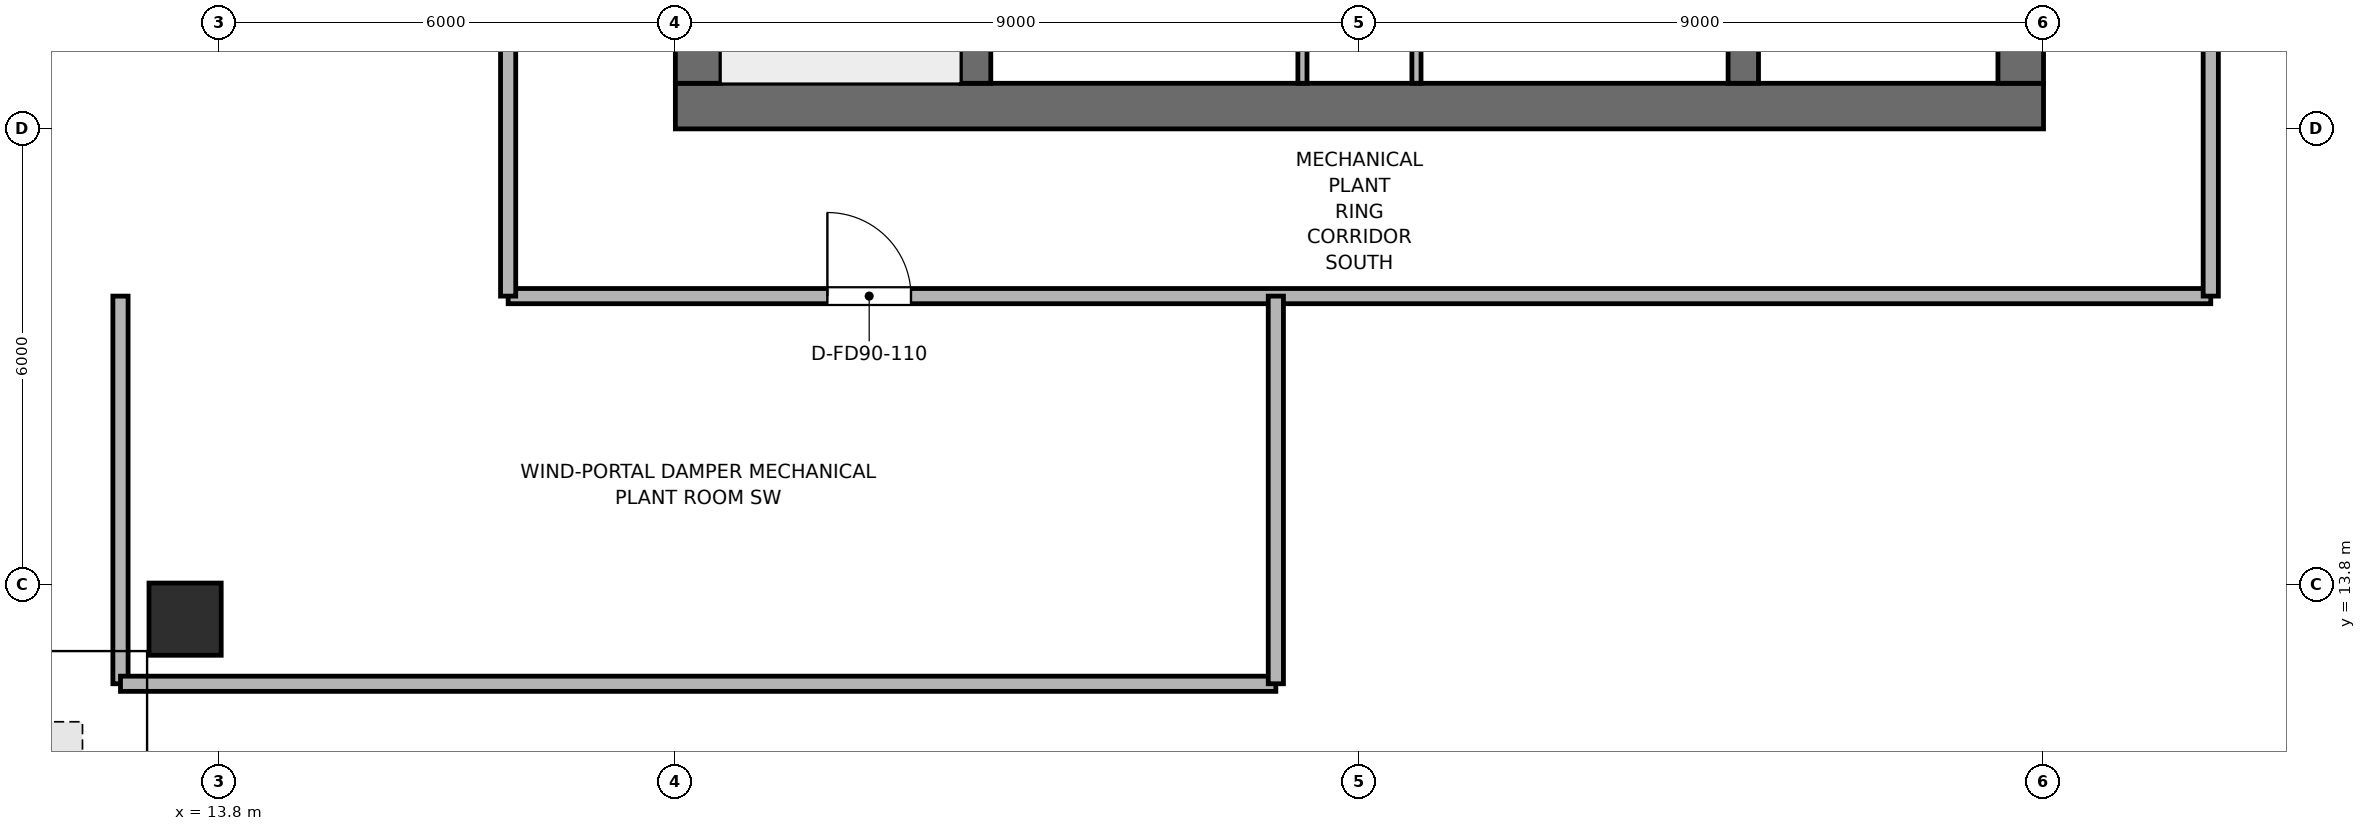
"""IFC4 building model, lengths in metres.
Left out: names, types, materials, properties, quantities, classifications, styles, units other than length and angle.
Written with IfcOpenShell. Run it as: python <this file> out.ifc"""

import sys

from ifc_helpers import new_model, si_unit, direction, frame, frame_2d, origin, origin_2d, place, context, subcontext, project, spatial, rectangle, extrude, element, fill, save


model = new_model("IFC4")
c1 = context("Model", 3, precision=1e-05, world=origin(), true_north=direction((0.0, 1.0)))
c2 = subcontext(c1, "Body", "Model", "MODEL_VIEW")
j1 = project(units=[si_unit("LENGTHUNIT", "METRE"), si_unit("PLANEANGLEUNIT", "RADIAN")], contexts=[c1])
p1 = place(None, origin())
s1 = spatial("IfcSite", under=j1, at=p1, CompositionType="ELEMENT")
p2 = place(p1, origin())
s2 = spatial("IfcBuilding", under=s1, at=p2, CompositionType="ELEMENT")
p3 = place(p2, frame((0.0, 0.0, 289.5)))
s3 = spatial("IfcBuildingStorey", under=s2, at=p3, CompositionType="ELEMENT", Elevation=289.5)
p4 = place(p3, frame((19.8, 20.1, 0.0), z_axis=(0.0, 0.0, 1.0), x_axis=(1.0, 0.0, 0.0)))
e1 = element("IfcWall", 1, at=p4, inside=s3, PredefinedType="SHEAR", context=c2, shape_type="SweptSolid", body=[
    extrude(rectangle(XDim=18.0, YDim=0.6, at=frame_2d((9.0, 0.0))), origin(), (0.0, 0.0, 1.0), 6.0),
])
p5 = place(p3, frame((20.1, 20.4, 0.0), z_axis=(0.0, 0.0, 1.0), x_axis=(0.0, 1.0, 0.0)))
e2 = element("IfcWall", 2, at=p5, inside=s3, PredefinedType="SHEAR", context=c2, shape_type="SweptSolid", body=[
    extrude(rectangle(XDim=16.8, YDim=0.6, at=frame_2d((8.4, 0.0))), origin(), (0.0, 0.0, 1.0), 6.0),
])
p6 = place(p5, frame((10.4, 0.0, 0.0)))
e3 = element("IfcOpeningElement", 3, at=p6, cuts=e2, PredefinedType="OPENING", context=c2, shape_type="SweptSolid", body=[
    extrude(rectangle(XDim=1.1, YDim=2.15, at=frame_2d((0.55, 1.075))), frame((0.0, 0.31, 0.0), z_axis=(0.0, -1.0, 0.0), x_axis=(1.0, 0.0, 0.0)), (0.0, 0.0, 1.0), 0.62),
])
p7 = place(p3, frame((37.5, 20.4, 0.0), z_axis=(0.0, 0.0, 1.0), x_axis=(0.0, 1.0, 0.0)))
e4 = element("IfcWall", 4, at=p7, inside=s3, PredefinedType="SHEAR", context=c2, shape_type="SweptSolid", body=[
    extrude(rectangle(XDim=16.8, YDim=0.6, at=frame_2d((8.4, 0.0))), origin(), (0.0, 0.0, 1.0), 6.0),
])
p8 = place(p7, frame((4.9, 0.0, 0.0)))
e5 = element("IfcOpeningElement", 5, at=p8, cuts=e4, PredefinedType="OPENING", context=c2, shape_type="SweptSolid", body=[
    extrude(rectangle(XDim=1.1, YDim=2.15, at=frame_2d((0.55, 1.075))), frame((0.0, 0.31, 0.0), z_axis=(0.0, -1.0, 0.0), x_axis=(1.0, 0.0, 0.0)), (0.0, 0.0, 1.0), 0.62),
])
for number, where, z_axis, x_axis in (
    (6, (23.75, 20.4, 0.0), (0.0, 0.0, 1.0), (0.0, 1.0, 0.0)),
    (7, (33.85, 20.4, 0.0), (0.0, 0.0, 1.0), (0.0, 1.0, 0.0)),
):
    element("IfcWall", number, at=place(p3, frame(where, z_axis=z_axis, x_axis=x_axis)), inside=s3, PredefinedType="SHEAR", context=c2, shape_type="SweptSolid", body=[
        extrude(rectangle(XDim=16.8, YDim=0.4, at=frame_2d((8.4, 0.0))), origin(), (0.0, 0.0, 1.0), 6.0),
    ])
p9 = place(p3, frame((13.35, 13.35, 0.003), z_axis=(0.049898628532, 0.049898628532, 0.997507019394), x_axis=(-0.707106781187, 0.707106781187, 0.0)))
e8 = element("IfcColumn", 8, at=p9, inside=s3, PredefinedType="COLUMN", context=c2, shape_type="SweptSolid", body=[
    extrude(rectangle(XDim=0.95, YDim=0.95, at=origin_2d()), origin(), (0.0, 0.0, 1.0), 5.769),
])
p10 = place(p3, frame((28.05, 20.4, 0.0), z_axis=(0.0, 0.0, 1.0), x_axis=(0.0, 1.0, 0.0)))
e9 = element("IfcWall", 9, at=p10, inside=s3, PredefinedType="PARTITIONING", context=c2, shape_type="SweptSolid", body=[
    extrude(rectangle(XDim=8.15, YDim=0.12, at=frame_2d((4.075, 0.0))), origin(), (0.0, 0.0, 1.0), 5.76),
])
p11 = place(p3, frame((29.55, 20.4, 0.0), z_axis=(0.0, 0.0, 1.0), x_axis=(0.0, 1.0, 0.0)))
e10 = element("IfcWall", 10, at=p11, inside=s3, PredefinedType="PARTITIONING", context=c2, shape_type="SweptSolid", body=[
    extrude(rectangle(XDim=2.75, YDim=0.12, at=frame_2d((1.375, 0.0))), origin(), (0.0, 0.0, 1.0), 5.76),
])
p12 = place(p3, frame((17.6, 17.6, 0.0), z_axis=(0.0, 0.0, 1.0), x_axis=(1.0, 0.0, 0.0)))
e11 = element("IfcWall", 11, at=p12, inside=s3, PredefinedType="PARTITIONING", context=c2, shape_type="SweptSolid", body=[
    extrude(rectangle(XDim=22.4, YDim=0.2, at=frame_2d((11.2, 0.0))), origin(), (0.0, 0.0, 1.0), 5.345),
])
p13 = place(p12, frame((4.2, 0.0, 0.0)))
e12 = element("IfcOpeningElement", 12, at=p13, cuts=e11, PredefinedType="OPENING", context=c2, shape_type="SweptSolid", body=[
    extrude(rectangle(XDim=1.1, YDim=2.15, at=frame_2d((0.55, 1.075))), frame((0.0, 0.11, 0.0), z_axis=(0.0, -1.0, 0.0), x_axis=(1.0, 0.0, 0.0)), (0.0, 0.0, 1.0), 0.22),
])
for number, where, z_axis, x_axis in (
    (13, (17.6, 17.6, 0.0), (0.0, 0.0, 1.0), (0.0, 1.0, 0.0)),
    (14, (40.0, 17.6, 0.0), (0.0, 0.0, 1.0), (0.0, 1.0, 0.0)),
):
    element("IfcWall", number, at=place(p3, frame(where, z_axis=z_axis, x_axis=x_axis)), inside=s3, PredefinedType="PARTITIONING", context=c2, shape_type="SweptSolid", body=[
        extrude(rectangle(XDim=22.4, YDim=0.2, at=frame_2d((11.2, 0.0))), origin(), (0.0, 0.0, 1.0), 5.345),
    ])
p14 = place(p3, frame((12.5, 12.5, 0.0), z_axis=(0.0, 0.0, 1.0), x_axis=(0.0, 1.0, 0.0)))
e15 = element("IfcWall", 15, at=p14, inside=s3, PredefinedType="PARTITIONING", context=c2, shape_type="SweptSolid", body=[
    extrude(rectangle(XDim=5.1, YDim=0.2, at=frame_2d((2.55, 0.0))), origin(), (0.0, 0.0, 1.0), 5.445),
])
p15 = place(p3, frame((12.5, 12.5, 0.0), z_axis=(0.0, 0.0, 1.0), x_axis=(1.0, 0.0, 0.0)))
e16 = element("IfcWall", 16, at=p15, inside=s3, PredefinedType="PARTITIONING", context=c2, shape_type="SweptSolid", body=[
    extrude(rectangle(XDim=15.2, YDim=0.2, at=frame_2d((7.6, 0.0))), origin(), (0.0, 0.0, 1.0), 5.345),
])
p16 = place(p3, frame((27.7, 12.5, 0.0), z_axis=(0.0, 0.0, 1.0), x_axis=(0.0, 1.0, 0.0)))
e17 = element("IfcWall", 17, at=p16, inside=s3, PredefinedType="PARTITIONING", context=c2, shape_type="SweptSolid", body=[
    extrude(rectangle(XDim=5.1, YDim=0.2, at=frame_2d((2.55, 0.0))), origin(), (0.0, 0.0, 1.0), 5.385),
])
p17 = place(p13, origin())
e18 = element("IfcDoor", 18, at=p17, inside=s3, OperationType="SINGLE_SWING_LEFT", PredefinedType="DOOR", context=c2, shape_type="SweptSolid", body=[
    extrude(rectangle(XDim=1.1, YDim=2.15, at=frame_2d((0.55, 1.075))), frame((0.0, 0.025, 0.0), z_axis=(0.0, -1.0, 0.0), x_axis=(1.0, 0.0, 0.0)), (0.0, 0.0, 1.0), 0.05),
])
fill(e12, e18)
save(model, sys.argv[1])
